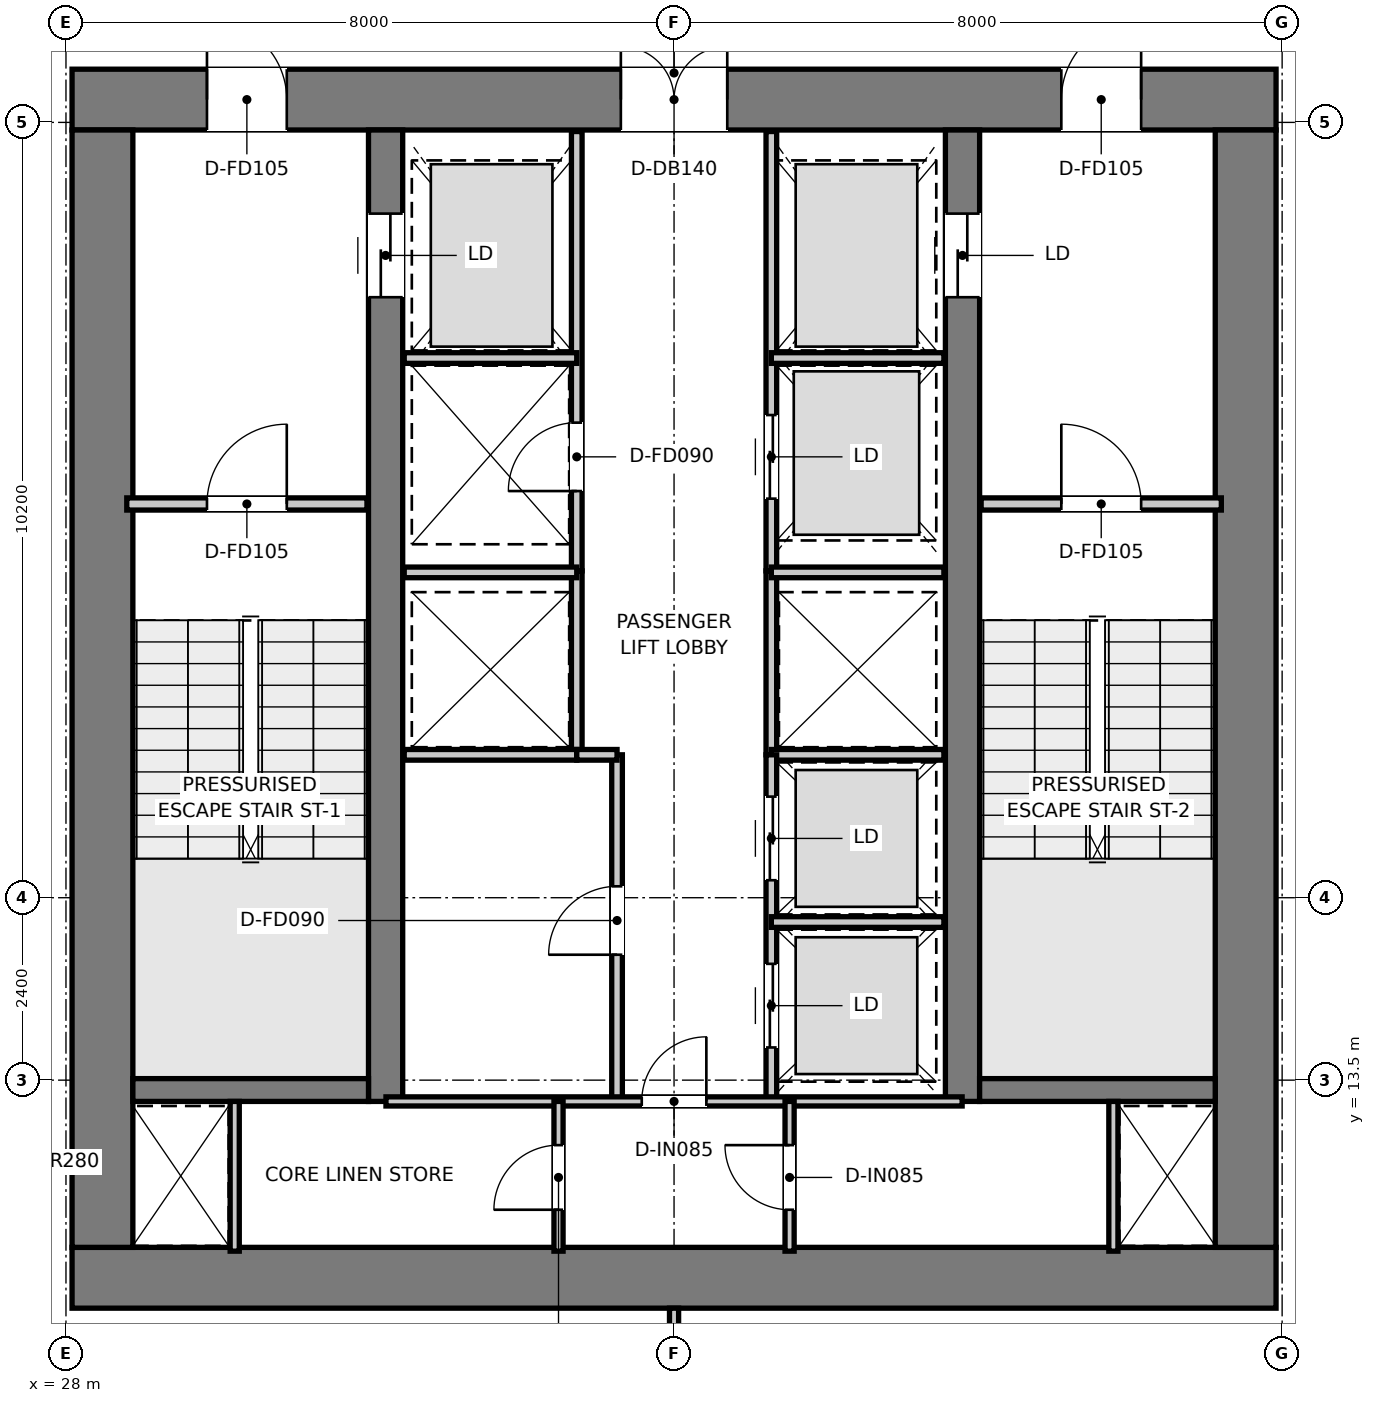
"""IFC4 building model, lengths in metres.
Left out: names, types, materials, properties, quantities, classifications, styles, units other than length and angle.
Written with IfcOpenShell. Run it as: python <this file> out.ifc"""

import sys

from ifc_helpers import new_model, si_unit, direction, frame, frame_2d, origin, place, context, subcontext, project, spatial, rectangle, extrude, element, fill, save


model = new_model("IFC4")
c1 = context("Model", 3, precision=1e-05, world=origin(), true_north=direction((0.0, 1.0)))
c2 = subcontext(c1, "Body", "Model", "MODEL_VIEW")
j1 = project(units=[si_unit("LENGTHUNIT", "METRE"), si_unit("PLANEANGLEUNIT", "RADIAN")], contexts=[c1])
p1 = place(None, origin())
s1 = spatial("IfcSite", under=j1, at=p1, CompositionType="ELEMENT")
p2 = place(p1, origin())
s2 = spatial("IfcBuilding", under=s1, at=p2, CompositionType="ELEMENT")
p3 = place(p2, frame((0.0, 0.0, 173.85)))
s3 = spatial("IfcBuildingStorey", under=s2, at=p3, CompositionType="ELEMENT", Elevation=173.85)
p4 = place(p3, frame((28.08, 10.9, 0.0), z_axis=(0.0, 0.0, 1.0), x_axis=(1.0, 0.0, 0.0)))
e1 = element("IfcWall", 1, at=p4, inside=s3, PredefinedType="SHEAR", context=c2, shape_type="SweptSolid", body=[
    extrude(rectangle(XDim=15.84, YDim=0.8, at=frame_2d((7.92, 0.0))), origin(), (0.0, 0.0, 1.0), 3.95),
])
p5 = place(p3, frame((28.08, 26.4, 0.0), z_axis=(0.0, 0.0, 1.0), x_axis=(1.0, 0.0, 0.0)))
e2 = element("IfcWall", 2, at=p5, inside=s3, PredefinedType="SHEAR", context=c2, shape_type="SweptSolid", body=[
    extrude(rectangle(XDim=15.84, YDim=0.8, at=frame_2d((7.92, 0.0))), origin(), (0.0, 0.0, 1.0), 3.95),
])
p6 = place(p5, frame((7.22, 0.0, 0.0)))
e3 = element("IfcOpeningElement", 3, at=p6, cuts=e2, PredefinedType="OPENING", context=c2, shape_type="SweptSolid", body=[
    extrude(rectangle(XDim=1.4, YDim=2.2, at=frame_2d((0.7, 1.1))), frame((0.0, 0.41, 0.0), z_axis=(0.0, -1.0, 0.0), x_axis=(1.0, 0.0, 0.0)), (0.0, 0.0, 1.0), 0.82),
])
p7 = place(p5, frame((1.775, 0.0, 0.0)))
e4 = element("IfcOpeningElement", 4, at=p7, cuts=e2, PredefinedType="OPENING", context=c2, shape_type="SweptSolid", body=[
    extrude(rectangle(XDim=1.05, YDim=2.1, at=frame_2d((0.525, 1.05))), frame((0.0, 0.41, 0.0), z_axis=(0.0, -1.0, 0.0), x_axis=(1.0, 0.0, 0.0)), (0.0, 0.0, 1.0), 0.82),
])
p8 = place(p5, frame((13.015, 0.0, 0.0)))
e5 = element("IfcOpeningElement", 5, at=p8, cuts=e2, PredefinedType="OPENING", context=c2, shape_type="SweptSolid", body=[
    extrude(rectangle(XDim=1.05, YDim=2.1, at=frame_2d((0.525, 1.05))), frame((0.0, 0.41, 0.0), z_axis=(0.0, -1.0, 0.0), x_axis=(1.0, 0.0, 0.0)), (0.0, 0.0, 1.0), 0.82),
])
for number, where, z_axis, x_axis in (
    (6, (28.48, 11.3, 0.0), (0.0, 0.0, 1.0), (0.0, 1.0, 0.0)),
    (7, (43.52, 11.3, 0.0), (0.0, 0.0, 1.0), (0.0, 1.0, 0.0)),
):
    element("IfcWall", number, at=place(p3, frame(where, z_axis=z_axis, x_axis=x_axis)), inside=s3, PredefinedType="SHEAR", context=c2, shape_type="SweptSolid", body=[
        extrude(rectangle(XDim=14.7, YDim=0.8, at=frame_2d((7.35, 0.0))), origin(), (0.0, 0.0, 1.0), 3.95),
    ])
p9 = place(p3, frame((32.205, 13.22, 0.0), z_axis=(0.0, 0.0, 1.0), x_axis=(0.0, 1.0, 0.0)))
e8 = element("IfcWall", 8, at=p9, inside=s3, PredefinedType="SHEAR", context=c2, shape_type="SweptSolid", body=[
    extrude(rectangle(XDim=12.78, YDim=0.45, at=frame_2d((6.39, 0.0))), origin(), (0.0, 0.0, 1.0), 3.95),
])
p10 = place(p9, frame((10.58, 0.0, 0.0)))
e9 = element("IfcOpeningElement", 9, at=p10, cuts=e8, PredefinedType="OPENING", context=c2, shape_type="SweptSolid", body=[
    extrude(rectangle(XDim=1.1, YDim=2.15, at=frame_2d((0.55, 1.075))), frame((0.0, 0.235, 0.0), z_axis=(0.0, -1.0, 0.0), x_axis=(1.0, 0.0, 0.0)), (0.0, 0.0, 1.0), 0.47),
])
p11 = place(p3, frame((39.795, 13.22, 0.0), z_axis=(0.0, 0.0, 1.0), x_axis=(0.0, 1.0, 0.0)))
e10 = element("IfcWall", 10, at=p11, inside=s3, PredefinedType="SHEAR", context=c2, shape_type="SweptSolid", body=[
    extrude(rectangle(XDim=12.78, YDim=0.45, at=frame_2d((6.39, 0.0))), origin(), (0.0, 0.0, 1.0), 3.95),
])
p12 = place(p11, frame((10.58, 0.0, 0.0)))
e11 = element("IfcOpeningElement", 11, at=p12, cuts=e10, PredefinedType="OPENING", context=c2, shape_type="SweptSolid", body=[
    extrude(rectangle(XDim=1.1, YDim=2.15, at=frame_2d((0.55, 1.075))), frame((0.0, 0.235, 0.0), z_axis=(0.0, -1.0, 0.0), x_axis=(1.0, 0.0, 0.0)), (0.0, 0.0, 1.0), 0.47),
])
for number, where, z_axis, x_axis in (
    (12, (28.88, 13.37, 0.0), (0.0, 0.0, 1.0), (1.0, 0.0, 0.0)),
    (13, (40.02, 13.37, 0.0), (0.0, 0.0, 1.0), (1.0, 0.0, 0.0)),
):
    element("IfcWall", number, at=place(p3, frame(where, z_axis=z_axis, x_axis=x_axis)), inside=s3, PredefinedType="SHEAR", context=c2, shape_type="SweptSolid", body=[
        extrude(rectangle(XDim=3.1, YDim=0.3, at=frame_2d((1.55, 0.0))), origin(), (0.0, 0.0, 1.0), 3.95),
    ])
p13 = place(p3, frame((28.8, 21.08, 0.0), z_axis=(0.0, 0.0, 1.0), x_axis=(1.0, 0.0, 0.0)))
e14 = element("IfcWall", 14, at=p13, inside=s3, PredefinedType="PARTITIONING", context=c2, shape_type="SweptSolid", body=[
    extrude(rectangle(XDim=3.16, YDim=0.16, at=frame_2d((1.58, 0.0))), origin(), (0.0, 0.0, 1.0), 3.67),
])
p14 = place(p13, frame((1.055, 0.0, 0.0)))
e15 = element("IfcOpeningElement", 15, at=p14, cuts=e14, PredefinedType="OPENING", context=c2, shape_type="SweptSolid", body=[
    extrude(rectangle(XDim=1.05, YDim=2.1, at=frame_2d((0.525, 1.05))), frame((0.0, 0.09, 0.0), z_axis=(0.0, -1.0, 0.0), x_axis=(1.0, 0.0, 0.0)), (0.0, 0.0, 1.0), 0.18),
])
p15 = place(p3, frame((40.04, 21.08, 0.0), z_axis=(0.0, 0.0, 1.0), x_axis=(1.0, 0.0, 0.0)))
e16 = element("IfcWall", 16, at=p15, inside=s3, PredefinedType="PARTITIONING", context=c2, shape_type="SweptSolid", body=[
    extrude(rectangle(XDim=3.16, YDim=0.16, at=frame_2d((1.58, 0.0))), origin(), (0.0, 0.0, 1.0), 3.67),
])
p16 = place(p15, frame((1.055, 0.0, 0.0)))
e17 = element("IfcOpeningElement", 17, at=p16, cuts=e16, PredefinedType="OPENING", context=c2, shape_type="SweptSolid", body=[
    extrude(rectangle(XDim=1.05, YDim=2.1, at=frame_2d((0.525, 1.05))), frame((0.0, 0.09, 0.0), z_axis=(0.0, -1.0, 0.0), x_axis=(1.0, 0.0, 0.0)), (0.0, 0.0, 1.0), 0.18),
])
p17 = place(p3, frame((34.72, 20.2, 0.0), z_axis=(0.0, 0.0, 1.0), x_axis=(0.0, 1.0, 0.0)))
e18 = element("IfcWall", 18, at=p17, inside=s3, PredefinedType="PARTITIONING", context=c2, shape_type="SweptSolid", body=[
    extrude(rectangle(XDim=5.78, YDim=0.14, at=frame_2d((2.89, 0.0))), origin(), (0.0, 0.0, 1.0), 2.67),
])
p18 = place(p17, frame((1.05, 0.0, 0.0)))
e19 = element("IfcOpeningElement", 19, at=p18, cuts=e18, PredefinedType="OPENING", context=c2, shape_type="SweptSolid", body=[
    extrude(rectangle(XDim=0.9, YDim=2.1, at=frame_2d((0.45, 1.05))), frame((0.0, 0.08, 0.0), z_axis=(0.0, -1.0, 0.0), x_axis=(1.0, 0.0, 0.0)), (0.0, 0.0, 1.0), 0.16),
])
p19 = place(p3, frame((37.28, 20.2, 0.0), z_axis=(0.0, 0.0, 1.0), x_axis=(0.0, 1.0, 0.0)))
e20 = element("IfcWall", 20, at=p19, inside=s3, PredefinedType="PARTITIONING", context=c2, shape_type="SweptSolid", body=[
    extrude(rectangle(XDim=5.78, YDim=0.14, at=frame_2d((2.89, 0.0))), origin(), (0.0, 0.0, 1.0), 2.67),
])
p20 = place(p19, frame((0.95, 0.0, 0.0)))
e21 = element("IfcOpeningElement", 21, at=p20, cuts=e20, PredefinedType="OPENING", context=c2, shape_type="SweptSolid", body=[
    extrude(rectangle(XDim=1.1, YDim=2.15, at=frame_2d((0.55, 1.075))), frame((0.0, 0.08, 0.0), z_axis=(0.0, -1.0, 0.0), x_axis=(1.0, 0.0, 0.0)), (0.0, 0.0, 1.0), 0.16),
])
for number, where, z_axis, x_axis in (
    (22, (32.45, 23.0, 0.0), (0.0, 0.0, 1.0), (1.0, 0.0, 0.0)),
    (23, (37.28, 23.0, 0.0), (0.0, 0.0, 1.0), (1.0, 0.0, 0.0)),
):
    element("IfcWall", number, at=place(p3, frame(where, z_axis=z_axis, x_axis=x_axis)), inside=s3, PredefinedType="PARTITIONING", context=c2, shape_type="SweptSolid", body=[
        extrude(rectangle(XDim=2.27, YDim=0.14, at=frame_2d((1.135, 0.0))), origin(), (0.0, 0.0, 1.0), 2.67),
    ])
for number, where, z_axis, x_axis in (
    (24, (34.72, 17.78, 0.0), (0.0, 0.0, 1.0), (0.0, 1.0, 0.0)),
    (25, (37.28, 17.78, 0.0), (0.0, 0.0, 1.0), (0.0, 1.0, 0.0)),
):
    element("IfcWall", number, at=place(p3, frame(where, z_axis=z_axis, x_axis=x_axis)), inside=s3, PredefinedType="PARTITIONING", context=c2, shape_type="SweptSolid", body=[
        extrude(rectangle(XDim=2.42, YDim=0.14, at=frame_2d((1.21, 0.0))), origin(), (0.0, 0.0, 1.0), 3.67),
    ])
for number, where, z_axis, x_axis in (
    (26, (32.45, 17.78, 0.0), (0.0, 0.0, 1.0), (1.0, 0.0, 0.0)),
    (27, (32.45, 20.18, 0.0), (0.0, 0.0, 1.0), (1.0, 0.0, 0.0)),
    (28, (37.28, 17.78, 0.0), (0.0, 0.0, 1.0), (1.0, 0.0, 0.0)),
    (29, (37.28, 20.18, 0.0), (0.0, 0.0, 1.0), (1.0, 0.0, 0.0)),
):
    element("IfcWall", number, at=place(p3, frame(where, z_axis=z_axis, x_axis=x_axis)), inside=s3, PredefinedType="PARTITIONING", context=c2, shape_type="SweptSolid", body=[
        extrude(rectangle(XDim=2.27, YDim=0.14, at=frame_2d((1.135, 0.0))), origin(), (0.0, 0.0, 1.0), 3.67),
    ])
p21 = place(p3, frame((35.25, 13.22, 0.0), z_axis=(0.0, 0.0, 1.0), x_axis=(0.0, 1.0, 0.0)))
e30 = element("IfcWall", 30, at=p21, inside=s3, PredefinedType="PARTITIONING", context=c2, shape_type="SweptSolid", body=[
    extrude(rectangle(XDim=4.56, YDim=0.14, at=frame_2d((2.28, 0.0))), origin(), (0.0, 0.0, 1.0), 3.67),
])
p22 = place(p21, frame((1.93, 0.0, 0.0)))
e31 = element("IfcOpeningElement", 31, at=p22, cuts=e30, PredefinedType="OPENING", context=c2, shape_type="SweptSolid", body=[
    extrude(rectangle(XDim=0.9, YDim=2.1, at=frame_2d((0.45, 1.05))), frame((0.0, 0.08, 0.0), z_axis=(0.0, -1.0, 0.0), x_axis=(1.0, 0.0, 0.0)), (0.0, 0.0, 1.0), 0.16),
])
p23 = place(p3, frame((34.72, 17.78, 0.0), z_axis=(0.0, 0.0, 1.0), x_axis=(1.0, 0.0, 0.0)))
e32 = element("IfcWall", 32, at=p23, inside=s3, PredefinedType="PARTITIONING", context=c2, shape_type="SweptSolid", body=[
    extrude(rectangle(XDim=0.53, YDim=0.14, at=frame_2d((0.265, 0.0))), origin(), (0.0, 0.0, 1.0), 3.67),
])
p24 = place(p3, frame((37.28, 13.22, 0.0), z_axis=(0.0, 0.0, 1.0), x_axis=(0.0, 1.0, 0.0)))
e33 = element("IfcWall", 33, at=p24, inside=s3, PredefinedType="PARTITIONING", context=c2, shape_type="SweptSolid", body=[
    extrude(rectangle(XDim=4.56, YDim=0.14, at=frame_2d((2.28, 0.0))), origin(), (0.0, 0.0, 1.0), 3.67),
])
p25 = place(p24, frame((0.71, 0.0, 0.0)))
e34 = element("IfcOpeningElement", 34, at=p25, cuts=e33, PredefinedType="OPENING", context=c2, shape_type="SweptSolid", body=[
    extrude(rectangle(XDim=1.1, YDim=2.15, at=frame_2d((0.55, 1.075))), frame((0.0, 0.08, 0.0), z_axis=(0.0, -1.0, 0.0), x_axis=(1.0, 0.0, 0.0)), (0.0, 0.0, 1.0), 0.16),
])
p26 = place(p24, frame((2.91, 0.0, 0.0)))
e35 = element("IfcOpeningElement", 35, at=p26, cuts=e33, PredefinedType="OPENING", context=c2, shape_type="SweptSolid", body=[
    extrude(rectangle(XDim=1.1, YDim=2.15, at=frame_2d((0.55, 1.075))), frame((0.0, 0.08, 0.0), z_axis=(0.0, -1.0, 0.0), x_axis=(1.0, 0.0, 0.0)), (0.0, 0.0, 1.0), 0.16),
])
p27 = place(p3, frame((37.28, 15.58, 0.0), z_axis=(0.0, 0.0, 1.0), x_axis=(1.0, 0.0, 0.0)))
e36 = element("IfcWall", 36, at=p27, inside=s3, PredefinedType="PARTITIONING", context=c2, shape_type="SweptSolid", body=[
    extrude(rectangle(XDim=2.27, YDim=0.14, at=frame_2d((1.135, 0.0))), origin(), (0.0, 0.0, 1.0), 3.67),
])
for number, where, z_axis, x_axis in (
    (37, (30.22, 11.25, 0.0), (0.0, 0.0, 1.0), (0.0, 1.0, 0.0)),
    (38, (41.78, 11.25, 0.0), (0.0, 0.0, 1.0), (0.0, 1.0, 0.0)),
):
    element("IfcWall", number, at=place(p3, frame(where, z_axis=z_axis, x_axis=x_axis)), inside=s3, PredefinedType="PARTITIONING", context=c2, shape_type="SweptSolid", body=[
        extrude(rectangle(XDim=1.97, YDim=0.12, at=frame_2d((0.985, 0.0))), origin(), (0.0, 0.0, 1.0), 3.67),
    ])
p28 = place(p3, frame((32.21, 13.22, 0.0), z_axis=(0.0, 0.0, 1.0), x_axis=(1.0, 0.0, 0.0)))
e39 = element("IfcWall", 39, at=p28, inside=s3, PredefinedType="PARTITIONING", context=c2, shape_type="SweptSolid", body=[
    extrude(rectangle(XDim=7.58, YDim=0.12, at=frame_2d((3.79, 0.0))), origin(), (0.0, 0.0, 1.0), 3.67),
])
p29 = place(p28, frame((3.365, 0.0, 0.0)))
e40 = element("IfcOpeningElement", 40, at=p29, cuts=e39, PredefinedType="OPENING", context=c2, shape_type="SweptSolid", body=[
    extrude(rectangle(XDim=0.85, YDim=2.1, at=frame_2d((0.425, 1.05))), frame((0.0, 0.07, 0.0), z_axis=(0.0, -1.0, 0.0), x_axis=(1.0, 0.0, 0.0)), (0.0, 0.0, 1.0), 0.14),
])
p30 = place(p3, frame((34.48, 11.25, 0.0), z_axis=(0.0, 0.0, 1.0), x_axis=(0.0, 1.0, 0.0)))
e41 = element("IfcWall", 41, at=p30, inside=s3, PredefinedType="PARTITIONING", context=c2, shape_type="SweptSolid", body=[
    extrude(rectangle(XDim=1.97, YDim=0.12, at=frame_2d((0.985, 0.0))), origin(), (0.0, 0.0, 1.0), 3.67),
])
p31 = place(p30, frame((0.545, 0.0, 0.0)))
e42 = element("IfcOpeningElement", 42, at=p31, cuts=e41, PredefinedType="OPENING", context=c2, shape_type="SweptSolid", body=[
    extrude(rectangle(XDim=0.85, YDim=2.1, at=frame_2d((0.425, 1.05))), frame((0.0, 0.07, 0.0), z_axis=(0.0, -1.0, 0.0), x_axis=(1.0, 0.0, 0.0)), (0.0, 0.0, 1.0), 0.14),
])
p32 = place(p3, frame((37.52, 11.25, 0.0), z_axis=(0.0, 0.0, 1.0), x_axis=(0.0, 1.0, 0.0)))
e43 = element("IfcWall", 43, at=p32, inside=s3, PredefinedType="PARTITIONING", context=c2, shape_type="SweptSolid", body=[
    extrude(rectangle(XDim=1.97, YDim=0.12, at=frame_2d((0.985, 0.0))), origin(), (0.0, 0.0, 1.0), 3.67),
])
p33 = place(p32, frame((0.545, 0.0, 0.0)))
e44 = element("IfcOpeningElement", 44, at=p33, cuts=e43, PredefinedType="OPENING", context=c2, shape_type="SweptSolid", body=[
    extrude(rectangle(XDim=0.85, YDim=2.1, at=frame_2d((0.425, 1.05))), frame((0.0, 0.07, 0.0), z_axis=(0.0, -1.0, 0.0), x_axis=(1.0, 0.0, 0.0)), (0.0, 0.0, 1.0), 0.14),
])
p34 = place(p3, frame((36.0, 1.017, 0.0), z_axis=(0.0, 0.0, 1.0), x_axis=(0.0, 1.0, 0.0)))
e45 = element("IfcWall", 45, at=p34, inside=s3, PredefinedType="PARTITIONING", context=c2, shape_type="SweptSolid", body=[
    extrude(rectangle(XDim=9.483, YDim=0.12, at=frame_2d((4.741, 0.0))), origin(), (0.0, 0.0, 1.0), 3.67),
])
p35 = place(p14, origin())
e46 = element("IfcDoor", 46, at=p35, inside=s3, OperationType="SINGLE_SWING_RIGHT", PredefinedType="DOOR", context=c2, shape_type="SweptSolid", body=[
    extrude(rectangle(XDim=1.05, YDim=2.1, at=frame_2d((0.525, 1.05))), frame((0.0, 0.025, 0.0), z_axis=(0.0, -1.0, 0.0), x_axis=(1.0, 0.0, 0.0)), (0.0, 0.0, 1.0), 0.05),
])
fill(e15, e46)
p36 = place(p16, origin())
e47 = element("IfcDoor", 47, at=p36, inside=s3, OperationType="SINGLE_SWING_LEFT", PredefinedType="DOOR", context=c2, shape_type="SweptSolid", body=[
    extrude(rectangle(XDim=1.05, YDim=2.1, at=frame_2d((0.525, 1.05))), frame((0.0, 0.025, 0.0), z_axis=(0.0, -1.0, 0.0), x_axis=(1.0, 0.0, 0.0)), (0.0, 0.0, 1.0), 0.05),
])
fill(e17, e47)
p37 = place(p6, origin())
e48 = element("IfcDoor", 48, at=p37, inside=s3, OperationType="DOUBLE_DOOR_SINGLE_SWING", PredefinedType="DOOR", context=c2, shape_type="SweptSolid", body=[
    extrude(rectangle(XDim=1.4, YDim=2.2, at=frame_2d((0.7, 1.1))), frame((0.0, 0.025, 0.0), z_axis=(0.0, -1.0, 0.0), x_axis=(1.0, 0.0, 0.0)), (0.0, 0.0, 1.0), 0.05),
])
fill(e3, e48)
p38 = place(p7, origin())
e49 = element("IfcDoor", 49, at=p38, inside=s3, OperationType="SINGLE_SWING_LEFT", PredefinedType="DOOR", context=c2, shape_type="SweptSolid", body=[
    extrude(rectangle(XDim=1.05, YDim=2.1, at=frame_2d((0.525, 1.05))), frame((0.0, 0.025, 0.0), z_axis=(0.0, -1.0, 0.0), x_axis=(1.0, 0.0, 0.0)), (0.0, 0.0, 1.0), 0.05),
])
fill(e4, e49)
p39 = place(p8, origin())
e50 = element("IfcDoor", 50, at=p39, inside=s3, OperationType="SINGLE_SWING_RIGHT", PredefinedType="DOOR", context=c2, shape_type="SweptSolid", body=[
    extrude(rectangle(XDim=1.05, YDim=2.1, at=frame_2d((0.525, 1.05))), frame((0.0, 0.025, 0.0), z_axis=(0.0, -1.0, 0.0), x_axis=(1.0, 0.0, 0.0)), (0.0, 0.0, 1.0), 0.05),
])
fill(e5, e50)
p40 = place(p10, origin())
e51 = element("IfcDoor", 51, at=p40, inside=s3, OperationType="DOUBLE_DOOR_SLIDING", PredefinedType="DOOR", context=c2, shape_type="SweptSolid", body=[
    extrude(rectangle(XDim=1.1, YDim=2.15, at=frame_2d((0.55, 1.075))), frame((0.0, 0.025, 0.0), z_axis=(0.0, -1.0, 0.0), x_axis=(1.0, 0.0, 0.0)), (0.0, 0.0, 1.0), 0.05),
])
fill(e9, e51)
p41 = place(p12, origin())
e52 = element("IfcDoor", 52, at=p41, inside=s3, OperationType="DOUBLE_DOOR_SLIDING", PredefinedType="DOOR", context=c2, shape_type="SweptSolid", body=[
    extrude(rectangle(XDim=1.1, YDim=2.15, at=frame_2d((0.55, 1.075))), frame((0.0, 0.025, 0.0), z_axis=(0.0, -1.0, 0.0), x_axis=(1.0, 0.0, 0.0)), (0.0, 0.0, 1.0), 0.05),
])
fill(e11, e52)
p42 = place(p18, origin())
e53 = element("IfcDoor", 53, at=p42, inside=s3, OperationType="SINGLE_SWING_LEFT", PredefinedType="DOOR", context=c2, shape_type="SweptSolid", body=[
    extrude(rectangle(XDim=0.9, YDim=2.1, at=frame_2d((0.45, 1.05))), frame((0.0, 0.025, 0.0), z_axis=(0.0, -1.0, 0.0), x_axis=(1.0, 0.0, 0.0)), (0.0, 0.0, 1.0), 0.05),
])
fill(e19, e53)
p43 = place(p20, origin())
e54 = element("IfcDoor", 54, at=p43, inside=s3, OperationType="DOUBLE_DOOR_SLIDING", PredefinedType="DOOR", context=c2, shape_type="SweptSolid", body=[
    extrude(rectangle(XDim=1.1, YDim=2.15, at=frame_2d((0.55, 1.075))), frame((0.0, 0.025, 0.0), z_axis=(0.0, -1.0, 0.0), x_axis=(1.0, 0.0, 0.0)), (0.0, 0.0, 1.0), 0.05),
])
fill(e21, e54)
p44 = place(p22, origin())
e55 = element("IfcDoor", 55, at=p44, inside=s3, OperationType="SINGLE_SWING_LEFT", PredefinedType="DOOR", context=c2, shape_type="SweptSolid", body=[
    extrude(rectangle(XDim=0.9, YDim=2.1, at=frame_2d((0.45, 1.05))), frame((0.0, 0.025, 0.0), z_axis=(0.0, -1.0, 0.0), x_axis=(1.0, 0.0, 0.0)), (0.0, 0.0, 1.0), 0.05),
])
fill(e31, e55)
p45 = place(p25, origin())
e56 = element("IfcDoor", 56, at=p45, inside=s3, OperationType="DOUBLE_DOOR_SLIDING", PredefinedType="DOOR", context=c2, shape_type="SweptSolid", body=[
    extrude(rectangle(XDim=1.1, YDim=2.15, at=frame_2d((0.55, 1.075))), frame((0.0, 0.025, 0.0), z_axis=(0.0, -1.0, 0.0), x_axis=(1.0, 0.0, 0.0)), (0.0, 0.0, 1.0), 0.05),
])
fill(e34, e56)
p46 = place(p26, origin())
e57 = element("IfcDoor", 57, at=p46, inside=s3, OperationType="DOUBLE_DOOR_SLIDING", PredefinedType="DOOR", context=c2, shape_type="SweptSolid", body=[
    extrude(rectangle(XDim=1.1, YDim=2.15, at=frame_2d((0.55, 1.075))), frame((0.0, 0.025, 0.0), z_axis=(0.0, -1.0, 0.0), x_axis=(1.0, 0.0, 0.0)), (0.0, 0.0, 1.0), 0.05),
])
fill(e35, e57)
p47 = place(p29, origin())
e58 = element("IfcDoor", 58, at=p47, inside=s3, OperationType="SINGLE_SWING_RIGHT", PredefinedType="DOOR", context=c2, shape_type="SweptSolid", body=[
    extrude(rectangle(XDim=0.85, YDim=2.1, at=frame_2d((0.425, 1.05))), frame((0.0, 0.025, 0.0), z_axis=(0.0, -1.0, 0.0), x_axis=(1.0, 0.0, 0.0)), (0.0, 0.0, 1.0), 0.05),
])
fill(e40, e58)
p48 = place(p31, origin())
e59 = element("IfcDoor", 59, at=p48, inside=s3, OperationType="SINGLE_SWING_LEFT", PredefinedType="DOOR", context=c2, shape_type="SweptSolid", body=[
    extrude(rectangle(XDim=0.85, YDim=2.1, at=frame_2d((0.425, 1.05))), frame((0.0, 0.025, 0.0), z_axis=(0.0, -1.0, 0.0), x_axis=(1.0, 0.0, 0.0)), (0.0, 0.0, 1.0), 0.05),
])
fill(e42, e59)
p49 = place(p33, origin())
e60 = element("IfcDoor", 60, at=p49, inside=s3, OperationType="SINGLE_SWING_RIGHT", PredefinedType="DOOR", context=c2, shape_type="SweptSolid", body=[
    extrude(rectangle(XDim=0.85, YDim=2.1, at=frame_2d((0.425, 1.05))), frame((0.0, 0.025, 0.0), z_axis=(0.0, -1.0, 0.0), x_axis=(1.0, 0.0, 0.0)), (0.0, 0.0, 1.0), 0.05),
])
fill(e44, e60)
save(model, sys.argv[1])
